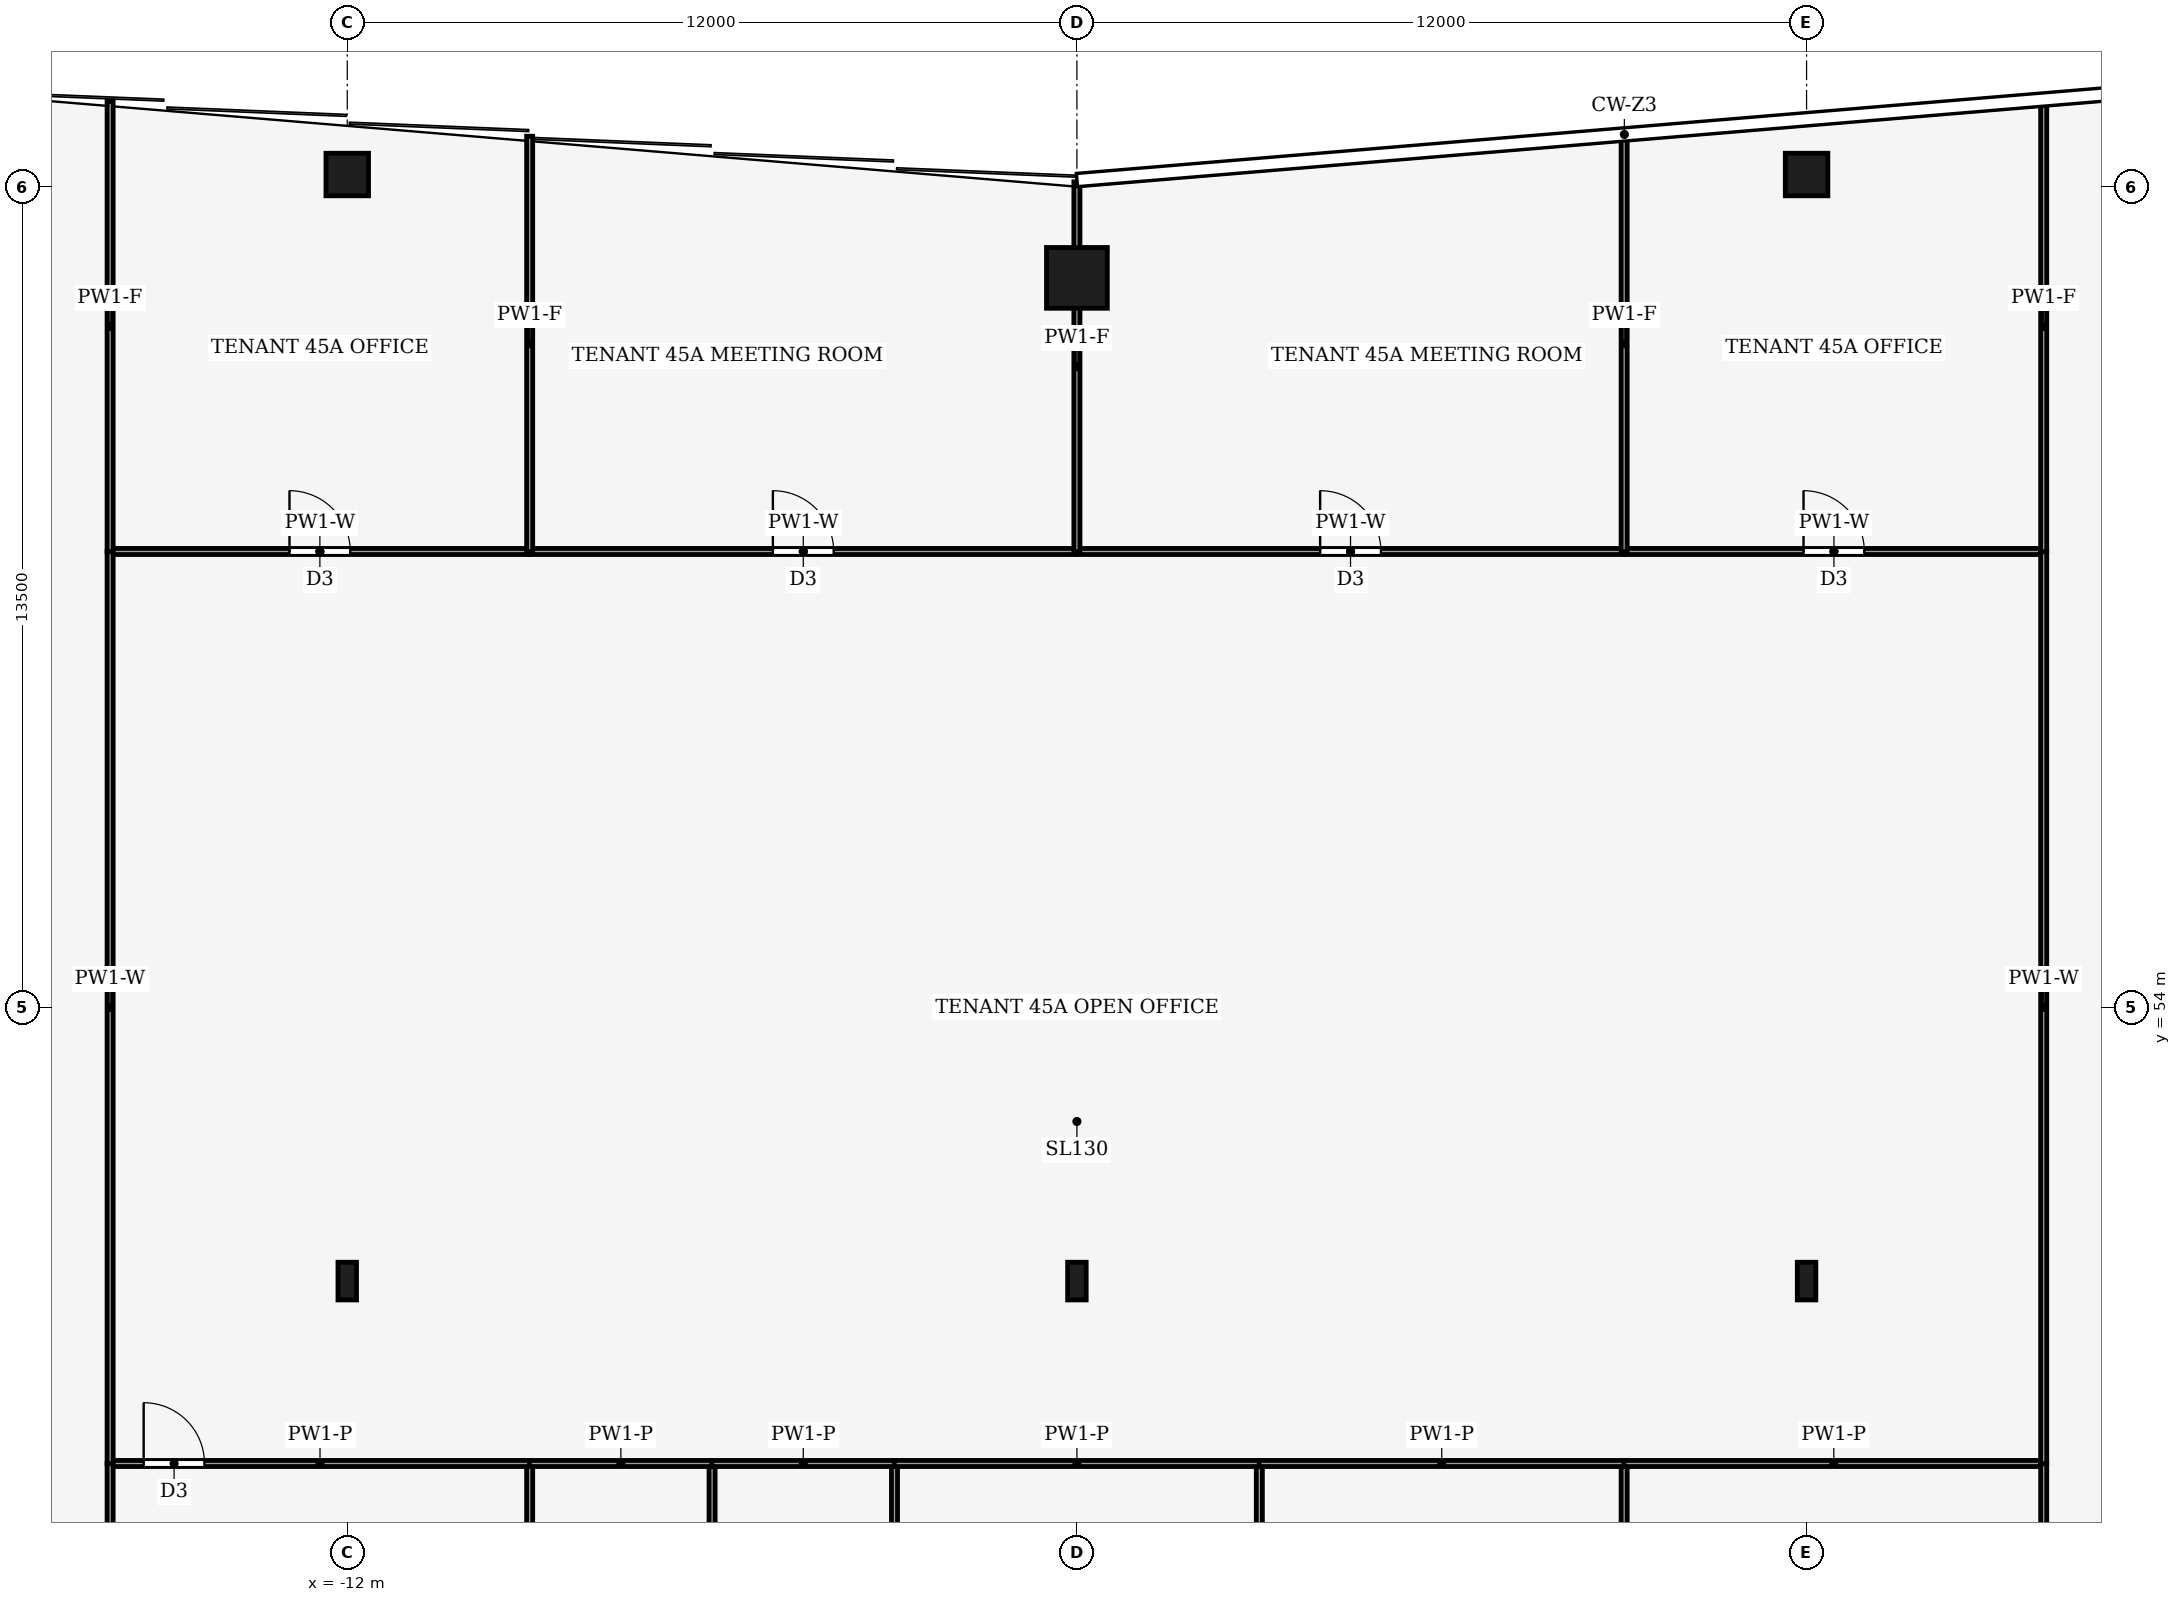
"""IFC4 building model, lengths in metres.
Left out: names, types, materials, properties, quantities, classifications, styles, units other than length and angle.
Written with IfcOpenShell. Run it as: python <this file> out.ifc"""

import sys

from ifc_helpers import new_model, si_unit, direction, frame, frame_2d, origin, origin_2d, place, context, subcontext, project, spatial, rectangle, hollow_rectangle, i_section, extrude, element, fill, save


model = new_model("IFC4")
c1 = context("Model", 3, precision=1e-05, world=origin(), true_north=direction((0.0, 1.0)))
c2 = subcontext(c1, "Body", "Model", "MODEL_VIEW")
j1 = project(units=[si_unit("LENGTHUNIT", "METRE"), si_unit("PLANEANGLEUNIT", "RADIAN")], contexts=[c1])
p1 = place(None, origin())
s1 = spatial("IfcSite", under=j1, at=p1, CompositionType="ELEMENT")
p2 = place(p1, origin())
s2 = spatial("IfcBuilding", under=s1, at=p2, CompositionType="ELEMENT")
p3 = place(p2, frame((0.0, 0.0, 198.0)))
s3 = spatial("IfcBuildingStorey", under=s2, at=p3, CompositionType="ELEMENT", Elevation=198.0)
p4 = place(p3, frame((0.0, 66.0, 0.0), z_axis=(0.0, 0.0, 1.0), x_axis=(1.0, 0.0, 0.0)))
e1 = element("IfcColumn", 1, at=p4, inside=s3, PredefinedType="COLUMN", context=c2, shape_type="SweptSolid", body=[
    extrude(hollow_rectangle(XDim=1.0, YDim=1.0, WallThickness=0.06, at=origin_2d()), origin(), (0.0, 0.0, 1.0), 4.0),
])
for number, where, z_axis, x_axis in (
    (2, (-12.0, 67.7, 0.0), (0.0, 0.0, 1.0), (1.0, 0.0, 0.0)),
    (3, (12.0, 67.7, 0.0), (0.0, 0.0, 1.0), (1.0, 0.0, 0.0)),
):
    element("IfcColumn", number, at=place(p3, frame(where, z_axis=z_axis, x_axis=x_axis)), inside=s3, PredefinedType="COLUMN", context=c2, shape_type="SweptSolid", body=[
        extrude(hollow_rectangle(XDim=0.7, YDim=0.7, WallThickness=0.03, at=origin_2d()), origin(), (0.0, 0.0, 1.0), 4.0),
    ])
for number, where, z_axis, x_axis in (
    (4, (-12.0, 49.5, 0.0), (0.0, 0.0, 1.0), (1.0, 0.0, 0.0)),
    (5, (0.0, 49.5, 0.0), (0.0, 0.0, 1.0), (1.0, 0.0, 0.0)),
    (6, (12.0, 49.5, 0.0), (0.0, 0.0, 1.0), (1.0, 0.0, 0.0)),
):
    element("IfcColumn", number, at=place(p3, frame(where, z_axis=z_axis, x_axis=x_axis)), inside=s3, PredefinedType="COLUMN", context=c2, shape_type="SweptSolid", body=[
        extrude(i_section(OverallWidth=0.305, OverallDepth=0.62, WebThickness=0.021, FlangeThickness=0.04, FilletRadius=0.027, at=origin_2d()), origin(), (0.0, 0.0, 1.0), 4.0),
    ])
p5 = place(p3, frame((-9.0, 46.5, 0.0), z_axis=(0.0, 0.0, 1.0), x_axis=(0.0, -1.0, 0.0)))
e7 = element("IfcWall", 7, at=p5, inside=s3, PredefinedType="PARTITIONING", context=c2, shape_type="SweptSolid", body=[
    extrude(rectangle(XDim=5.6, YDim=0.1, at=frame_2d((2.8, 0.0))), origin(), (0.0, 0.0, 1.0), 3.87),
])
p6 = place(p5, frame((2.3, 0.0, 0.0)))
e8 = element("IfcOpeningElement", 8, at=p6, cuts=e7, PredefinedType="OPENING", context=c2, shape_type="SweptSolid", body=[
    extrude(rectangle(XDim=1.0, YDim=2.1, at=frame_2d((0.5, 1.05))), frame((0.0, 0.06, 0.0), z_axis=(0.0, -1.0, 0.0), x_axis=(1.0, 0.0, 0.0)), (0.0, 0.0, 1.0), 0.12),
])
p7 = place(p3, frame((-15.9, 46.5, 0.0), z_axis=(0.0, 0.0, 1.0), x_axis=(1.0, 0.0, 0.0)))
e9 = element("IfcWall", 9, at=p7, inside=s3, PredefinedType="PARTITIONING", context=c2, shape_type="SweptSolid", body=[
    extrude(rectangle(XDim=6.904, YDim=0.1, at=frame_2d((3.452, 0.0))), origin(), (0.0, 0.0, 1.0), 3.44),
])
p8 = place(p7, frame((0.552, 0.0, 0.0)))
e10 = element("IfcOpeningElement", 10, at=p8, cuts=e9, PredefinedType="OPENING", context=c2, shape_type="SweptSolid", body=[
    extrude(rectangle(XDim=1.0, YDim=2.1, at=frame_2d((0.5, 1.05))), frame((0.0, 0.06, 0.0), z_axis=(0.0, -1.0, 0.0), x_axis=(1.0, 0.0, 0.0)), (0.0, 0.0, 1.0), 0.12),
])
p9 = place(p3, frame((-15.9, 46.504, 0.0), z_axis=(0.0, 0.0, 1.0), x_axis=(0.0, -1.0, 0.0)))
e11 = element("IfcWall", 11, at=p9, inside=s3, PredefinedType="PARTITIONING", context=c2, shape_type="SweptSolid", body=[
    extrude(rectangle(XDim=5.608, YDim=0.1, at=frame_2d((2.804, 0.0))), origin(), (0.0, 0.0, 1.0), 3.44),
])
p10 = place(p3, frame((-6.0, 46.5, 0.0), z_axis=(0.0, 0.0, 1.0), x_axis=(0.0, -1.0, 0.0)))
e12 = element("IfcWall", 12, at=p10, inside=s3, PredefinedType="PARTITIONING", context=c2, shape_type="SweptSolid", body=[
    extrude(rectangle(XDim=5.6, YDim=0.1, at=frame_2d((2.8, 0.0))), origin(), (0.0, 0.0, 1.0), 3.87),
])
p11 = place(p10, frame((2.3, 0.0, 0.0)))
e13 = element("IfcOpeningElement", 13, at=p11, cuts=e12, PredefinedType="OPENING", context=c2, shape_type="SweptSolid", body=[
    extrude(rectangle(XDim=1.0, YDim=2.1, at=frame_2d((0.5, 1.05))), frame((0.0, 0.06, 0.0), z_axis=(0.0, -1.0, 0.0), x_axis=(1.0, 0.0, 0.0)), (0.0, 0.0, 1.0), 0.12),
])
p12 = place(p3, frame((-5.996, 46.5, 0.0), z_axis=(0.0, 0.0, 1.0), x_axis=(-1.0, 0.0, 0.0)))
e14 = element("IfcWall", 14, at=p12, inside=s3, PredefinedType="PARTITIONING", context=c2, shape_type="SweptSolid", body=[
    extrude(rectangle(XDim=3.008, YDim=0.1, at=frame_2d((1.504, 0.0))), origin(), (0.0, 0.0, 1.0), 3.44),
])
p13 = place(p3, frame((-3.0, 40.9, 0.0), z_axis=(0.0, 0.0, 1.0), x_axis=(0.0, 1.0, 0.0)))
e15 = element("IfcWall", 15, at=p13, inside=s3, PredefinedType="PARTITIONING", context=c2, shape_type="SweptSolid", body=[
    extrude(rectangle(XDim=5.6, YDim=0.1, at=frame_2d((2.8, 0.0))), origin(), (0.0, 0.0, 1.0), 3.87),
])
p14 = place(p3, frame((-2.996, 46.5, 0.0), z_axis=(0.0, 0.0, 1.0), x_axis=(-1.0, 0.0, 0.0)))
e16 = element("IfcWall", 16, at=p14, inside=s3, PredefinedType="PARTITIONING", context=c2, shape_type="SweptSolid", body=[
    extrude(rectangle(XDim=3.008, YDim=0.1, at=frame_2d((1.504, 0.0))), origin(), (0.0, 0.0, 1.0), 3.44),
])
p15 = place(p3, frame((3.0, 40.9, 0.0), z_axis=(0.0, 0.0, 1.0), x_axis=(0.0, 1.0, 0.0)))
e17 = element("IfcWall", 17, at=p15, inside=s3, PredefinedType="PARTITIONING", context=c2, shape_type="SweptSolid", body=[
    extrude(rectangle(XDim=5.6, YDim=0.1, at=frame_2d((2.8, 0.0))), origin(), (0.0, 0.0, 1.0), 3.87),
])
p16 = place(p3, frame((3.004, 46.5, 0.0), z_axis=(0.0, 0.0, 1.0), x_axis=(-1.0, 0.0, 0.0)))
e18 = element("IfcWall", 18, at=p16, inside=s3, PredefinedType="PARTITIONING", context=c2, shape_type="SweptSolid", body=[
    extrude(rectangle(XDim=6.008, YDim=0.1, at=frame_2d((3.004, 0.0))), origin(), (0.0, 0.0, 1.0), 3.44),
])
p17 = place(p3, frame((9.0, 40.9, 0.0), z_axis=(0.0, 0.0, 1.0), x_axis=(0.0, 1.0, 0.0)))
e19 = element("IfcWall", 19, at=p17, inside=s3, PredefinedType="PARTITIONING", context=c2, shape_type="SweptSolid", body=[
    extrude(rectangle(XDim=5.6, YDim=0.1, at=frame_2d((2.8, 0.0))), origin(), (0.0, 0.0, 1.0), 3.87),
])
p18 = place(p3, frame((9.004, 46.5, 0.0), z_axis=(0.0, 0.0, 1.0), x_axis=(-1.0, 0.0, 0.0)))
e20 = element("IfcWall", 20, at=p18, inside=s3, PredefinedType="PARTITIONING", context=c2, shape_type="SweptSolid", body=[
    extrude(rectangle(XDim=6.008, YDim=0.1, at=frame_2d((3.004, 0.0))), origin(), (0.0, 0.0, 1.0), 3.44),
])
p19 = place(p3, frame((15.9, 46.5, 0.0), z_axis=(0.0, 0.0, 1.0), x_axis=(-1.0, 0.0, 0.0)))
e21 = element("IfcWall", 21, at=p19, inside=s3, PredefinedType="PARTITIONING", context=c2, shape_type="SweptSolid", body=[
    extrude(rectangle(XDim=6.904, YDim=0.1, at=frame_2d((3.452, 0.0))), origin(), (0.0, 0.0, 1.0), 3.44),
])
p20 = place(p3, frame((15.9, 40.896, 0.0), z_axis=(0.0, 0.0, 1.0), x_axis=(0.0, 1.0, 0.0)))
e22 = element("IfcWall", 22, at=p20, inside=s3, PredefinedType="PARTITIONING", context=c2, shape_type="SweptSolid", body=[
    extrude(rectangle(XDim=5.608, YDim=0.1, at=frame_2d((2.804, 0.0))), origin(), (0.0, 0.0, 1.0), 3.44),
])
p21 = place(p3, frame((-15.9, 61.5, 0.0), z_axis=(0.0, 0.0, 1.0), x_axis=(1.0, 0.0, 0.0)))
e23 = element("IfcWall", 23, at=p21, inside=s3, PredefinedType="PARTITIONING", context=c2, shape_type="SweptSolid", body=[
    extrude(rectangle(XDim=6.9, YDim=0.1, at=frame_2d((3.45, 0.0))), origin(), (0.0, 0.0, 1.0), 3.24),
])
p22 = place(p21, frame((2.95, 0.0, 0.0)))
e24 = element("IfcOpeningElement", 24, at=p22, cuts=e23, PredefinedType="OPENING", context=c2, shape_type="SweptSolid", body=[
    extrude(rectangle(XDim=1.0, YDim=2.1, at=frame_2d((0.5, 1.05))), frame((0.0, 0.06, 0.0), z_axis=(0.0, -1.0, 0.0), x_axis=(1.0, 0.0, 0.0)), (0.0, 0.0, 1.0), 0.12),
])
p23 = place(p3, frame((-9.0, 61.5, 0.0), z_axis=(0.0, 0.0, 1.0), x_axis=(1.0, 0.0, 0.0)))
e25 = element("IfcWall", 25, at=p23, inside=s3, PredefinedType="PARTITIONING", context=c2, shape_type="SweptSolid", body=[
    extrude(rectangle(XDim=9.0, YDim=0.1, at=frame_2d((4.5, 0.0))), origin(), (0.0, 0.0, 1.0), 3.24),
])
p24 = place(p23, frame((4.0, 0.0, 0.0)))
e26 = element("IfcOpeningElement", 26, at=p24, cuts=e25, PredefinedType="OPENING", context=c2, shape_type="SweptSolid", body=[
    extrude(rectangle(XDim=1.0, YDim=2.1, at=frame_2d((0.5, 1.05))), frame((0.0, 0.06, 0.0), z_axis=(0.0, -1.0, 0.0), x_axis=(1.0, 0.0, 0.0)), (0.0, 0.0, 1.0), 0.12),
])
p25 = place(p3, frame((0.0, 61.5, 0.0), z_axis=(0.0, 0.0, 1.0), x_axis=(1.0, 0.0, 0.0)))
e27 = element("IfcWall", 27, at=p25, inside=s3, PredefinedType="PARTITIONING", context=c2, shape_type="SweptSolid", body=[
    extrude(rectangle(XDim=9.0, YDim=0.1, at=frame_2d((4.5, 0.0))), origin(), (0.0, 0.0, 1.0), 3.24),
])
p26 = place(p25, frame((4.0, 0.0, 0.0)))
e28 = element("IfcOpeningElement", 28, at=p26, cuts=e27, PredefinedType="OPENING", context=c2, shape_type="SweptSolid", body=[
    extrude(rectangle(XDim=1.0, YDim=2.1, at=frame_2d((0.5, 1.05))), frame((0.0, 0.06, 0.0), z_axis=(0.0, -1.0, 0.0), x_axis=(1.0, 0.0, 0.0)), (0.0, 0.0, 1.0), 0.12),
])
p27 = place(p3, frame((9.0, 61.5, 0.0), z_axis=(0.0, 0.0, 1.0), x_axis=(1.0, 0.0, 0.0)))
e29 = element("IfcWall", 29, at=p27, inside=s3, PredefinedType="PARTITIONING", context=c2, shape_type="SweptSolid", body=[
    extrude(rectangle(XDim=6.9, YDim=0.1, at=frame_2d((3.45, 0.0))), origin(), (0.0, 0.0, 1.0), 3.24),
])
p28 = place(p27, frame((2.95, 0.0, 0.0)))
e30 = element("IfcOpeningElement", 30, at=p28, cuts=e29, PredefinedType="OPENING", context=c2, shape_type="SweptSolid", body=[
    extrude(rectangle(XDim=1.0, YDim=2.1, at=frame_2d((0.5, 1.05))), frame((0.0, 0.06, 0.0), z_axis=(0.0, -1.0, 0.0), x_axis=(1.0, 0.0, 0.0)), (0.0, 0.0, 1.0), 0.12),
])
for number, where, z_axis, x_axis in (
    (31, (-15.9, 61.504, 0.0), (0.0, 0.0, 1.0), (0.0, -1.0, 0.0)),
    (32, (15.9, 46.496, 0.0), (0.0, 0.0, 1.0), (0.0, 1.0, 0.0)),
):
    element("IfcWall", number, at=place(p3, frame(where, z_axis=z_axis, x_axis=x_axis)), inside=s3, PredefinedType="PARTITIONING", context=c2, shape_type="SweptSolid", body=[
        extrude(rectangle(XDim=15.008, YDim=0.1, at=frame_2d((7.504, 0.0))), origin(), (0.0, 0.0, 1.0), 3.24),
    ])
p29 = place(p3, frame((-9.0, 61.5, 0.0), z_axis=(0.0, 0.0, 1.0), x_axis=(0.0, 1.0, 0.0)))
e33 = element("IfcWall", 33, at=p29, inside=s3, PredefinedType="PARTITIONING", context=c2, shape_type="SweptSolid", body=[
    extrude(rectangle(XDim=6.83, YDim=0.1, at=frame_2d((3.415, 0.0))), origin(), (0.0, 0.0, 1.0), 3.04),
])
p30 = place(p3, frame((-15.9, 68.905, 0.0), z_axis=(0.0, 0.0, 1.0), x_axis=(0.0, -1.0, 0.0)))
e34 = element("IfcWall", 34, at=p30, inside=s3, PredefinedType="PARTITIONING", context=c2, shape_type="SweptSolid", body=[
    extrude(rectangle(XDim=7.409, YDim=0.1, at=frame_2d((3.705, 0.0))), origin(), (0.0, 0.0, 1.0), 3.04),
])
p31 = place(p3, frame((0.0, 61.5, 0.0), z_axis=(0.0, 0.0, 1.0), x_axis=(0.0, 1.0, 0.0)))
e35 = element("IfcWall", 35, at=p31, inside=s3, PredefinedType="PARTITIONING", context=c2, shape_type="SweptSolid", body=[
    extrude(rectangle(XDim=6.08, YDim=0.1, at=frame_2d((3.04, 0.0))), origin(), (0.0, 0.0, 1.0), 3.04),
])
p32 = place(p3, frame((9.0, 61.5, 0.0), z_axis=(0.0, 0.0, 1.0), x_axis=(0.0, 1.0, 0.0)))
e36 = element("IfcWall", 36, at=p32, inside=s3, PredefinedType="PARTITIONING", context=c2, shape_type="SweptSolid", body=[
    extrude(rectangle(XDim=6.83, YDim=0.1, at=frame_2d((3.415, 0.0))), origin(), (0.0, 0.0, 1.0), 3.04),
])
p33 = place(p3, frame((15.9, 61.496, 0.0), z_axis=(0.0, 0.0, 1.0), x_axis=(0.0, 1.0, 0.0)))
e37 = element("IfcWall", 37, at=p33, inside=s3, PredefinedType="PARTITIONING", context=c2, shape_type="SweptSolid", body=[
    extrude(rectangle(XDim=7.409, YDim=0.1, at=frame_2d((3.705, 0.0))), origin(), (0.0, 0.0, 1.0), 3.04),
])
p34 = place(p8, origin())
e38 = element("IfcDoor", 38, at=p34, inside=s3, OperationType="SINGLE_SWING_LEFT", PredefinedType="DOOR", context=c2, shape_type="SweptSolid", body=[
    extrude(rectangle(XDim=1.0, YDim=2.1, at=frame_2d((0.5, 1.05))), frame((0.0, 0.025, 0.0), z_axis=(0.0, -1.0, 0.0), x_axis=(1.0, 0.0, 0.0)), (0.0, 0.0, 1.0), 0.05),
])
fill(e10, e38)
p35 = place(p22, origin())
e39 = element("IfcDoor", 39, at=p35, inside=s3, OperationType="SINGLE_SWING_LEFT", PredefinedType="DOOR", context=c2, shape_type="SweptSolid", body=[
    extrude(rectangle(XDim=1.0, YDim=2.1, at=frame_2d((0.5, 1.05))), frame((0.0, 0.025, 0.0), z_axis=(0.0, -1.0, 0.0), x_axis=(1.0, 0.0, 0.0)), (0.0, 0.0, 1.0), 0.05),
])
fill(e24, e39)
p36 = place(p24, origin())
e40 = element("IfcDoor", 40, at=p36, inside=s3, OperationType="SINGLE_SWING_RIGHT", PredefinedType="DOOR", context=c2, shape_type="SweptSolid", body=[
    extrude(rectangle(XDim=1.0, YDim=2.1, at=frame_2d((0.5, 1.05))), frame((0.0, 0.025, 0.0), z_axis=(0.0, -1.0, 0.0), x_axis=(1.0, 0.0, 0.0)), (0.0, 0.0, 1.0), 0.05),
])
fill(e26, e40)
p37 = place(p26, origin())
e41 = element("IfcDoor", 41, at=p37, inside=s3, OperationType="SINGLE_SWING_LEFT", PredefinedType="DOOR", context=c2, shape_type="SweptSolid", body=[
    extrude(rectangle(XDim=1.0, YDim=2.1, at=frame_2d((0.5, 1.05))), frame((0.0, 0.025, 0.0), z_axis=(0.0, -1.0, 0.0), x_axis=(1.0, 0.0, 0.0)), (0.0, 0.0, 1.0), 0.05),
])
fill(e28, e41)
p38 = place(p28, origin())
e42 = element("IfcDoor", 42, at=p38, inside=s3, OperationType="SINGLE_SWING_RIGHT", PredefinedType="DOOR", context=c2, shape_type="SweptSolid", body=[
    extrude(rectangle(XDim=1.0, YDim=2.1, at=frame_2d((0.5, 1.05))), frame((0.0, 0.025, 0.0), z_axis=(0.0, -1.0, 0.0), x_axis=(1.0, 0.0, 0.0)), (0.0, 0.0, 1.0), 0.05),
])
fill(e30, e42)
save(model, sys.argv[1])
